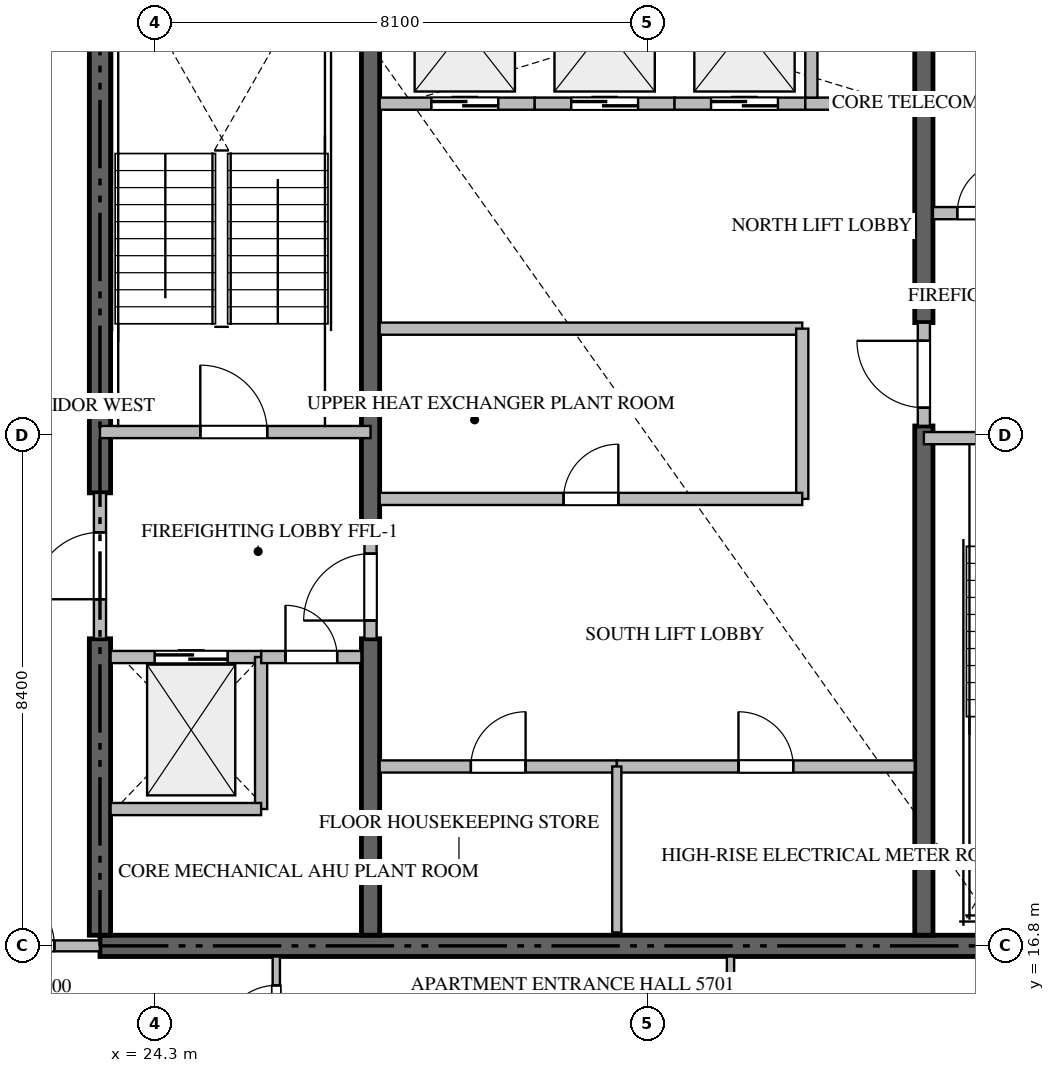
"""IFC4 building model, lengths in metres.
Left out: names, types, materials, properties, quantities, classifications, styles, units other than length and angle.
Written with IfcOpenShell. Run it as: python <this file> out.ifc"""

import sys

from ifc_helpers import new_model, si_unit, direction, frame, frame_2d, origin, place, context, subcontext, project, spatial, rectangle, extrude, source, transform, mapped, element, fill, save


model = new_model("IFC4")
c1 = context("Model", 3, precision=1e-05, world=origin(), true_north=direction((0.0, 1.0)))
c2 = subcontext(c1, "Body", "Model", "MODEL_VIEW")
j1 = project(units=[si_unit("LENGTHUNIT", "METRE"), si_unit("PLANEANGLEUNIT", "RADIAN")], contexts=[c1])
p1 = place(None, origin())
s1 = spatial("IfcSite", under=j1, at=p1, CompositionType="ELEMENT")
p2 = place(p1, origin())
s2 = spatial("IfcBuilding", under=s1, at=p2, CompositionType="ELEMENT")
p3 = place(p2, frame((0.0, 0.0, 229.7)))
s3 = spatial("IfcBuildingStorey", under=s2, at=p3, CompositionType="ELEMENT", Elevation=229.7)
p4 = place(p3, frame((23.4, 16.8, -0.26), z_axis=(0.0, 0.0, 1.0), x_axis=(1.0, 0.0, 0.0)))
e1 = element("IfcWall", 1, at=p4, inside=s3, PredefinedType="SHEAR", context=c2, shape_type="SweptSolid", body=[
    extrude(rectangle(XDim=18.0, YDim=0.35, at=frame_2d((9.0, 0.0))), origin(), (0.0, 0.0, 1.0), 3.848),
])
p5 = place(p3, frame((23.4, 16.975, -0.26), z_axis=(0.0, 0.0, 1.0), x_axis=(0.0, 1.0, 0.0)))
e2 = element("IfcWall", 2, at=p5, inside=s3, PredefinedType="SHEAR", context=c2, shape_type="SweptSolid", body=[
    extrude(rectangle(XDim=4.875, YDim=0.35, at=frame_2d((2.438, 0.0))), origin(), (0.0, 0.0, 1.0), 3.848),
])
p6 = place(p3, frame((23.4, 24.25, -0.26), z_axis=(0.0, 0.0, 1.0), x_axis=(0.0, 1.0, 0.0)))
e3 = element("IfcWall", 3, at=p6, inside=s3, PredefinedType="SHEAR", context=c2, shape_type="SweptSolid", body=[
    extrude(rectangle(XDim=9.175, YDim=0.35, at=frame_2d((4.587, 0.0))), origin(), (0.0, 0.0, 1.0), 3.848),
])
p7 = place(p3, frame((27.85, 16.975, -0.26), z_axis=(0.0, 0.0, 1.0), x_axis=(0.0, 1.0, 0.0)))
e4 = element("IfcWall", 4, at=p7, inside=s3, PredefinedType="SHEAR", context=c2, shape_type="SweptSolid", body=[
    extrude(rectangle(XDim=4.875, YDim=0.3, at=frame_2d((2.438, 0.0))), origin(), (0.0, 0.0, 1.0), 3.848),
])
p8 = place(p3, frame((27.85, 23.55, -0.26), z_axis=(0.0, 0.0, 1.0), x_axis=(0.0, 1.0, 0.0)))
e5 = element("IfcWall", 5, at=p8, inside=s3, PredefinedType="SHEAR", context=c2, shape_type="SweptSolid", body=[
    extrude(rectangle(XDim=9.875, YDim=0.3, at=frame_2d((4.938, 0.0))), origin(), (0.0, 0.0, 1.0), 3.848),
])
p9 = place(p3, frame((36.95, 16.975, -0.26), z_axis=(0.0, 0.0, 1.0), x_axis=(0.0, 1.0, 0.0)))
e6 = element("IfcWall", 6, at=p9, inside=s3, PredefinedType="SHEAR", context=c2, shape_type="SweptSolid", body=[
    extrude(rectangle(XDim=8.375, YDim=0.3, at=frame_2d((4.188, 0.0))), origin(), (0.0, 0.0, 1.0), 3.848),
])
p10 = place(p3, frame((36.95, 27.05, -0.26), z_axis=(0.0, 0.0, 1.0), x_axis=(0.0, 1.0, 0.0)))
e7 = element("IfcWall", 7, at=p10, inside=s3, PredefinedType="SHEAR", context=c2, shape_type="SweptSolid", body=[
    extrude(rectangle(XDim=6.375, YDim=0.3, at=frame_2d((3.188, 0.0))), origin(), (0.0, 0.0, 1.0), 3.848),
])
p11 = place(p3, frame((23.4, 25.25, 0.0), z_axis=(0.0, 0.0, 1.0), x_axis=(1.0, 0.0, 0.0)))
e8 = element("IfcWall", 8, at=p11, inside=s3, PredefinedType="STANDARD", context=c2, shape_type="SweptSolid", body=[
    extrude(rectangle(XDim=4.45, YDim=0.2, at=frame_2d((2.225, 0.0))), origin(), (0.0, 0.0, 1.0), 3.59),
])
p12 = place(p11, frame((1.65, 0.0, 0.0)))
e9 = element("IfcOpeningElement", 9, at=p12, cuts=e8, PredefinedType="OPENING", context=c2, shape_type="SweptSolid", body=[
    extrude(rectangle(XDim=1.1, YDim=2.15, at=frame_2d((0.55, 1.075))), frame((0.0, 0.11, 0.0), z_axis=(0.0, -1.0, 0.0), x_axis=(1.0, 0.0, 0.0)), (0.0, 0.0, 1.0), 0.22),
])
p13 = place(p3, frame((36.95, 25.15, 0.0), z_axis=(0.0, 0.0, 1.0), x_axis=(1.0, 0.0, 0.0)))
e10 = element("IfcWall", 10, at=p13, inside=s3, PredefinedType="STANDARD", context=c2, shape_type="SweptSolid", body=[
    extrude(rectangle(XDim=4.45, YDim=0.2, at=frame_2d((2.225, 0.0))), origin(), (0.0, 0.0, 1.0), 3.59),
])
p14 = place(p13, frame((1.65, 0.0, 0.0)))
e11 = element("IfcOpeningElement", 11, at=p14, cuts=e10, PredefinedType="OPENING", context=c2, shape_type="SweptSolid", body=[
    extrude(rectangle(XDim=1.1, YDim=2.15, at=frame_2d((0.55, 1.075))), frame((0.0, 0.11, 0.0), z_axis=(0.0, -1.0, 0.0), x_axis=(1.0, 0.0, 0.0)), (0.0, 0.0, 1.0), 0.22),
])
p15 = place(p3, frame((23.575, 21.55, 0.0), z_axis=(0.0, 0.0, 1.0), x_axis=(1.0, 0.0, 0.0)))
e12 = element("IfcWall", 12, at=p15, inside=s3, PredefinedType="STANDARD", context=c2, shape_type="SweptSolid", body=[
    extrude(rectangle(XDim=2.475, YDim=0.2, at=frame_2d((1.238, 0.0))), origin(), (0.0, 0.0, 1.0), 3.59),
])
p16 = place(p15, frame((0.725, 0.0, 0.0)))
e13 = element("IfcOpeningElement", 13, at=p16, cuts=e12, PredefinedType="OPENING", context=c2, shape_type="SweptSolid", body=[
    extrude(rectangle(XDim=1.2, YDim=2.2, at=frame_2d((0.6, 1.1))), frame((0.0, 0.11, 0.0), z_axis=(0.0, -1.0, 0.0), x_axis=(1.0, 0.0, 0.0)), (0.0, 0.0, 1.0), 0.22),
])
p17 = place(p3, frame((28.0, 30.65, 0.0), z_axis=(0.0, 0.0, 1.0), x_axis=(1.0, 0.0, 0.0)))
e14 = element("IfcWall", 14, at=p17, inside=s3, PredefinedType="STANDARD", context=c2, shape_type="SweptSolid", body=[
    extrude(rectangle(XDim=2.55, YDim=0.2, at=frame_2d((1.275, 0.0))), origin(), (0.0, 0.0, 1.0), 3.59),
])
p18 = place(p17, frame((0.85, 0.0, 0.0)))
e15 = element("IfcOpeningElement", 15, at=p18, cuts=e14, PredefinedType="OPENING", context=c2, shape_type="SweptSolid", body=[
    extrude(rectangle(XDim=1.1, YDim=2.2, at=frame_2d((0.55, 1.1))), frame((0.0, 0.11, 0.0), z_axis=(0.0, -1.0, 0.0), x_axis=(1.0, 0.0, 0.0)), (0.0, 0.0, 1.0), 0.22),
])
p19 = place(p3, frame((30.55, 30.65, 0.0), z_axis=(0.0, 0.0, 1.0), x_axis=(1.0, 0.0, 0.0)))
e16 = element("IfcWall", 16, at=p19, inside=s3, PredefinedType="STANDARD", context=c2, shape_type="SweptSolid", body=[
    extrude(rectangle(XDim=2.3, YDim=0.2, at=frame_2d((1.15, 0.0))), origin(), (0.0, 0.0, 1.0), 3.59),
])
p20 = place(p19, frame((0.6, 0.0, 0.0)))
e17 = element("IfcOpeningElement", 17, at=p20, cuts=e16, PredefinedType="OPENING", context=c2, shape_type="SweptSolid", body=[
    extrude(rectangle(XDim=1.1, YDim=2.2, at=frame_2d((0.55, 1.1))), frame((0.0, 0.11, 0.0), z_axis=(0.0, -1.0, 0.0), x_axis=(1.0, 0.0, 0.0)), (0.0, 0.0, 1.0), 0.22),
])
p21 = place(p3, frame((32.85, 30.65, 0.0), z_axis=(0.0, 0.0, 1.0), x_axis=(1.0, 0.0, 0.0)))
e18 = element("IfcWall", 18, at=p21, inside=s3, PredefinedType="STANDARD", context=c2, shape_type="SweptSolid", body=[
    extrude(rectangle(XDim=2.15, YDim=0.2, at=frame_2d((1.075, 0.0))), origin(), (0.0, 0.0, 1.0), 3.59),
])
p22 = place(p21, frame((0.6, 0.0, 0.0)))
e19 = element("IfcOpeningElement", 19, at=p22, cuts=e18, PredefinedType="OPENING", context=c2, shape_type="SweptSolid", body=[
    extrude(rectangle(XDim=1.1, YDim=2.2, at=frame_2d((0.55, 1.1))), frame((0.0, 0.11, 0.0), z_axis=(0.0, -1.0, 0.0), x_axis=(1.0, 0.0, 0.0)), (0.0, 0.0, 1.0), 0.22),
])
p23 = place(p3, frame((35.0, 30.65, 0.0), z_axis=(0.0, 0.0, 1.0), x_axis=(1.0, 0.0, 0.0)))
e20 = element("IfcWall", 20, at=p23, inside=s3, PredefinedType="STANDARD", context=c2, shape_type="SweptSolid", body=[
    extrude(rectangle(XDim=1.8, YDim=0.2, at=frame_2d((0.9, 0.0))), origin(), (0.0, 0.0, 1.0), 3.59),
])
p24 = place(p3, frame((35.1, 30.75, 0.0), z_axis=(0.0, 0.0, 1.0), x_axis=(0.0, 1.0, 0.0)))
e21 = element("IfcWall", 21, at=p24, inside=s3, PredefinedType="STANDARD", context=c2, shape_type="SweptSolid", body=[
    extrude(rectangle(XDim=2.675, YDim=0.2, at=frame_2d((1.337, 0.0))), origin(), (0.0, 0.0, 1.0), 3.59),
])
p25 = place(p3, frame((26.05, 19.05, 0.0), z_axis=(0.0, 0.0, 1.0), x_axis=(0.0, 1.0, 0.0)))
e22 = element("IfcWall", 22, at=p25, inside=s3, PredefinedType="STANDARD", context=c2, shape_type="SweptSolid", body=[
    extrude(rectangle(XDim=2.5, YDim=0.2, at=frame_2d((1.25, 0.0))), origin(), (0.0, 0.0, 1.0), 3.59),
])
p26 = place(p3, frame((23.575, 19.05, 0.0), z_axis=(0.0, 0.0, 1.0), x_axis=(1.0, 0.0, 0.0)))
e23 = element("IfcWall", 23, at=p26, inside=s3, PredefinedType="STANDARD", context=c2, shape_type="SweptSolid", body=[
    extrude(rectangle(XDim=2.475, YDim=0.2, at=frame_2d((1.238, 0.0))), origin(), (0.0, 0.0, 1.0), 3.59),
])
p27 = place(p3, frame((26.052, 21.55, 0.0), z_axis=(0.0, 0.0, 1.0), x_axis=(1.0, 0.0, 0.0)))
e24 = element("IfcWall", 24, at=p27, inside=s3, PredefinedType="STANDARD", context=c2, shape_type="SweptSolid", body=[
    extrude(rectangle(XDim=1.648, YDim=0.2, at=frame_2d((0.824, 0.0))), origin(), (0.0, 0.0, 1.0), 3.59),
])
p28 = place(p27, frame((0.399, 0.0, 0.0)))
e25 = element("IfcOpeningElement", 25, at=p28, cuts=e24, PredefinedType="OPENING", context=c2, shape_type="SweptSolid", body=[
    extrude(rectangle(XDim=0.85, YDim=2.1, at=frame_2d((0.425, 1.05))), frame((0.0, 0.11, 0.0), z_axis=(0.0, -1.0, 0.0), x_axis=(1.0, 0.0, 0.0)), (0.0, 0.0, 1.0), 0.22),
])
p29 = place(p3, frame((37.1, 28.85, 0.0), z_axis=(0.0, 0.0, 1.0), x_axis=(1.0, 0.0, 0.0)))
e26 = element("IfcWall", 26, at=p29, inside=s3, PredefinedType="STANDARD", context=c2, shape_type="SweptSolid", body=[
    extrude(rectangle(XDim=1.648, YDim=0.2, at=frame_2d((0.824, 0.0))), origin(), (0.0, 0.0, 1.0), 3.59),
])
p30 = place(p29, frame((0.399, 0.0, 0.0)))
e27 = element("IfcOpeningElement", 27, at=p30, cuts=e26, PredefinedType="OPENING", context=c2, shape_type="SweptSolid", body=[
    extrude(rectangle(XDim=0.85, YDim=2.1, at=frame_2d((0.425, 1.05))), frame((0.0, 0.11, 0.0), z_axis=(0.0, -1.0, 0.0), x_axis=(1.0, 0.0, 0.0)), (0.0, 0.0, 1.0), 0.22),
])
p31 = place(p3, frame((23.4, 21.852, 0.0), z_axis=(0.0, 0.0, 1.0), x_axis=(0.0, 1.0, 0.0)))
e28 = element("IfcWall", 28, at=p31, inside=s3, PredefinedType="STANDARD", context=c2, shape_type="SweptSolid", body=[
    extrude(rectangle(XDim=2.396, YDim=0.2, at=frame_2d((1.198, 0.0))), origin(), (0.0, 0.0, 1.0), 3.59),
])
p32 = place(p31, frame((0.648, 0.0, 0.0)))
e29 = element("IfcOpeningElement", 29, at=p32, cuts=e28, PredefinedType="OPENING", context=c2, shape_type="SweptSolid", body=[
    extrude(rectangle(XDim=1.1, YDim=2.15, at=frame_2d((0.55, 1.075))), frame((0.0, 0.11, 0.0), z_axis=(0.0, -1.0, 0.0), x_axis=(1.0, 0.0, 0.0)), (0.0, 0.0, 1.0), 0.22),
])
p33 = place(p3, frame((27.85, 21.852, 0.0), z_axis=(0.0, 0.0, 1.0), x_axis=(0.0, 1.0, 0.0)))
e30 = element("IfcWall", 30, at=p33, inside=s3, PredefinedType="STANDARD", context=c2, shape_type="SweptSolid", body=[
    extrude(rectangle(XDim=1.696, YDim=0.2, at=frame_2d((0.848, 0.0))), origin(), (0.0, 0.0, 1.0), 3.59),
])
p34 = place(p33, frame((0.298, 0.0, 0.0)))
e31 = element("IfcOpeningElement", 31, at=p34, cuts=e30, PredefinedType="OPENING", context=c2, shape_type="SweptSolid", body=[
    extrude(rectangle(XDim=1.1, YDim=2.15, at=frame_2d((0.55, 1.075))), frame((0.0, 0.11, 0.0), z_axis=(0.0, -1.0, 0.0), x_axis=(1.0, 0.0, 0.0)), (0.0, 0.0, 1.0), 0.22),
])
p35 = place(p3, frame((36.95, 25.352, 0.0), z_axis=(0.0, 0.0, 1.0), x_axis=(0.0, 1.0, 0.0)))
e32 = element("IfcWall", 32, at=p35, inside=s3, PredefinedType="STANDARD", context=c2, shape_type="SweptSolid", body=[
    extrude(rectangle(XDim=1.696, YDim=0.2, at=frame_2d((0.848, 0.0))), origin(), (0.0, 0.0, 1.0), 3.59),
])
p36 = place(p35, frame((0.298, 0.0, 0.0)))
e33 = element("IfcOpeningElement", 33, at=p36, cuts=e32, PredefinedType="OPENING", context=c2, shape_type="SweptSolid", body=[
    extrude(rectangle(XDim=1.1, YDim=2.15, at=frame_2d((0.55, 1.075))), frame((0.0, 0.11, 0.0), z_axis=(0.0, -1.0, 0.0), x_axis=(1.0, 0.0, 0.0)), (0.0, 0.0, 1.0), 0.22),
])
p37 = place(p3, frame((28.0, 19.75, 0.0), z_axis=(0.0, 0.0, 1.0), x_axis=(1.0, 0.0, 0.0)))
e34 = element("IfcWall", 34, at=p37, inside=s3, PredefinedType="STANDARD", context=c2, shape_type="SweptSolid", body=[
    extrude(rectangle(XDim=3.9, YDim=0.2, at=frame_2d((1.95, 0.0))), origin(), (0.0, 0.0, 1.0), 3.59),
])
p38 = place(p37, frame((1.5, 0.0, 0.0)))
e35 = element("IfcOpeningElement", 35, at=p38, cuts=e34, PredefinedType="OPENING", context=c2, shape_type="SweptSolid", body=[
    extrude(rectangle(XDim=0.9, YDim=2.1, at=frame_2d((0.45, 1.05))), frame((0.0, 0.11, 0.0), z_axis=(0.0, -1.0, 0.0), x_axis=(1.0, 0.0, 0.0)), (0.0, 0.0, 1.0), 0.22),
])
p39 = place(p3, frame((31.902, 19.75, 0.0), z_axis=(0.0, 0.0, 1.0), x_axis=(1.0, 0.0, 0.0)))
e36 = element("IfcWall", 36, at=p39, inside=s3, PredefinedType="STANDARD", context=c2, shape_type="SweptSolid", body=[
    extrude(rectangle(XDim=4.898, YDim=0.2, at=frame_2d((2.449, 0.0))), origin(), (0.0, 0.0, 1.0), 3.59),
])
p40 = place(p39, frame((1.999, 0.0, 0.0)))
e37 = element("IfcOpeningElement", 37, at=p40, cuts=e36, PredefinedType="OPENING", context=c2, shape_type="SweptSolid", body=[
    extrude(rectangle(XDim=0.9, YDim=2.1, at=frame_2d((0.45, 1.05))), frame((0.0, 0.11, 0.0), z_axis=(0.0, -1.0, 0.0), x_axis=(1.0, 0.0, 0.0)), (0.0, 0.0, 1.0), 0.22),
])
p41 = place(p3, frame((31.9, 17.02, 0.0), z_axis=(0.0, 0.0, 1.0), x_axis=(0.0, 1.0, 0.0)))
e38 = element("IfcWall", 38, at=p41, inside=s3, PredefinedType="PARTITIONING", context=c2, shape_type="SweptSolid", body=[
    extrude(rectangle(XDim=2.73, YDim=0.15, at=frame_2d((1.365, 0.0))), origin(), (0.0, 0.0, 1.0), 3.59),
])
p42 = place(p3, frame((28.0, 26.95, 0.0), z_axis=(0.0, 0.0, 1.0), x_axis=(1.0, 0.0, 0.0)))
e39 = element("IfcWall", 39, at=p42, inside=s3, PredefinedType="STANDARD", context=c2, shape_type="SweptSolid", body=[
    extrude(rectangle(XDim=6.95, YDim=0.2, at=frame_2d((3.475, 0.0))), origin(), (0.0, 0.0, 1.0), 3.59),
])
p43 = place(p3, frame((34.95, 24.15, 0.0), z_axis=(0.0, 0.0, 1.0), x_axis=(0.0, 1.0, 0.0)))
e40 = element("IfcWall", 40, at=p43, inside=s3, PredefinedType="STANDARD", context=c2, shape_type="SweptSolid", body=[
    extrude(rectangle(XDim=2.8, YDim=0.2, at=frame_2d((1.4, 0.0))), origin(), (0.0, 0.0, 1.0), 3.59),
])
p44 = place(p3, frame((28.0, 24.15, 0.0), z_axis=(0.0, 0.0, 1.0), x_axis=(1.0, 0.0, 0.0)))
e41 = element("IfcWall", 41, at=p44, inside=s3, PredefinedType="STANDARD", context=c2, shape_type="SweptSolid", body=[
    extrude(rectangle(XDim=6.95, YDim=0.2, at=frame_2d((3.475, 0.0))), origin(), (0.0, 0.0, 1.0), 3.59),
])
p45 = place(p44, frame((3.025, 0.0, 0.0)))
e42 = element("IfcOpeningElement", 42, at=p45, cuts=e41, PredefinedType="OPENING", context=c2, shape_type="SweptSolid", body=[
    extrude(rectangle(XDim=0.9, YDim=2.1, at=frame_2d((0.45, 1.05))), frame((0.0, 0.11, 0.0), z_axis=(0.0, -1.0, 0.0), x_axis=(1.0, 0.0, 0.0)), (0.0, 0.0, 1.0), 0.22),
])
p46 = place(p3, frame((20.902, 16.8, 0.0), z_axis=(0.0, 0.0, 1.0), x_axis=(1.0, 0.0, 0.0)))
e43 = element("IfcWall", 43, at=p46, inside=s3, PredefinedType="PARTITIONING", context=c2, shape_type="SweptSolid", body=[
    extrude(rectangle(XDim=2.496, YDim=0.18, at=frame_2d((1.248, 0.0))), origin(), (0.0, 0.0, 1.0), 3.59),
])
p47 = place(p46, frame((0.748, 0.0, 0.0)))
e44 = element("IfcOpeningElement", 44, at=p47, cuts=e43, PredefinedType="OPENING", context=c2, shape_type="SweptSolid", body=[
    extrude(rectangle(XDim=1.0, YDim=2.15, at=frame_2d((0.5, 1.075))), frame((0.0, 0.1, 0.0), z_axis=(0.0, -1.0, 0.0), x_axis=(1.0, 0.0, 0.0)), (0.0, 0.0, 1.0), 0.2),
])
p48 = place(p3, frame((26.3, 14.65, 0.0), z_axis=(0.0, 0.0, 1.0), x_axis=(0.0, 1.0, 0.0)))
e45 = element("IfcWall", 45, at=p48, inside=s3, PredefinedType="PARTITIONING", context=c2, shape_type="SweptSolid", body=[
    extrude(rectangle(XDim=1.975, YDim=0.12, at=frame_2d((0.988, 0.0))), origin(), (0.0, 0.0, 1.0), 3.59),
])
p49 = place(p48, frame((0.601, 0.0, 0.0)))
e46 = element("IfcOpeningElement", 46, at=p49, cuts=e45, PredefinedType="OPENING", context=c2, shape_type="SweptSolid", body=[
    extrude(rectangle(XDim=0.9, YDim=2.1, at=frame_2d((0.45, 1.05))), frame((0.0, 0.07, 0.0), z_axis=(0.0, -1.0, 0.0), x_axis=(1.0, 0.0, 0.0)), (0.0, 0.0, 1.0), 0.14),
])
p50 = place(p3, frame((33.77, 14.652, 0.0), z_axis=(0.0, 0.0, 1.0), x_axis=(0.0, 1.0, 0.0)))
e47 = element("IfcWall", 47, at=p50, inside=s3, PredefinedType="PARTITIONING", context=c2, shape_type="SweptSolid", body=[
    extrude(rectangle(XDim=1.973, YDim=0.12, at=frame_2d((0.986, 0.0))), origin(), (0.0, 0.0, 1.0), 3.59),
])
m1 = source(origin(), c2, "Body", "SweptSolid", [
    extrude(rectangle(XDim=1.1, YDim=2.15, at=frame_2d((0.55, 1.075))), frame((0.0, 0.025, 0.0), z_axis=(0.0, -1.0, 0.0), x_axis=(1.0, 0.0, 0.0)), (0.0, 0.0, 1.0), 0.05),
])
p51 = place(p12, origin())
e48 = element("IfcDoor", 48, at=p51, inside=s3, OperationType="SINGLE_SWING_LEFT", PredefinedType="DOOR", context=c2, shape_type="MappedRepresentation", body=[
    mapped(m1, transform((0.0, 0.0, 0.0), scale=1.0)),
])
fill(e9, e48)
m2 = source(origin(), c2, "Body", "SweptSolid", [
    extrude(rectangle(XDim=1.2, YDim=2.2, at=frame_2d((0.6, 1.1))), frame((0.0, 0.025, 0.0), z_axis=(0.0, -1.0, 0.0), x_axis=(1.0, 0.0, 0.0)), (0.0, 0.0, 1.0), 0.05),
])
p52 = place(p16, origin())
e49 = element("IfcDoor", 49, at=p52, inside=s3, OperationType="DOUBLE_DOOR_SLIDING", PredefinedType="DOOR", context=c2, shape_type="MappedRepresentation", body=[
    mapped(m2, transform((0.0, 0.0, 0.0), scale=1.0)),
])
fill(e13, e49)
m3 = source(origin(), c2, "Body", "SweptSolid", [
    extrude(rectangle(XDim=1.1, YDim=2.2, at=frame_2d((0.55, 1.1))), frame((0.0, 0.025, 0.0), z_axis=(0.0, -1.0, 0.0), x_axis=(1.0, 0.0, 0.0)), (0.0, 0.0, 1.0), 0.05),
])
p53 = place(p18, origin())
e50 = element("IfcDoor", 50, at=p53, inside=s3, OperationType="DOUBLE_DOOR_SLIDING", PredefinedType="DOOR", context=c2, shape_type="MappedRepresentation", body=[
    mapped(m3, transform((0.0, 0.0, 0.0), scale=1.0)),
])
fill(e15, e50)
p54 = place(p20, origin())
e51 = element("IfcDoor", 51, at=p54, inside=s3, OperationType="DOUBLE_DOOR_SLIDING", PredefinedType="DOOR", context=c2, shape_type="MappedRepresentation", body=[
    mapped(m3, transform((0.0, 0.0, 0.0), scale=1.0)),
])
fill(e17, e51)
p55 = place(p22, origin())
e52 = element("IfcDoor", 52, at=p55, inside=s3, OperationType="DOUBLE_DOOR_SLIDING", PredefinedType="DOOR", context=c2, shape_type="MappedRepresentation", body=[
    mapped(m3, transform((0.0, 0.0, 0.0), scale=1.0)),
])
fill(e19, e52)
m4 = source(origin(), c2, "Body", "SweptSolid", [
    extrude(rectangle(XDim=0.85, YDim=2.1, at=frame_2d((0.425, 1.05))), frame((0.0, 0.025, 0.0), z_axis=(0.0, -1.0, 0.0), x_axis=(1.0, 0.0, 0.0)), (0.0, 0.0, 1.0), 0.05),
])
p56 = place(p28, origin())
e53 = element("IfcDoor", 53, at=p56, inside=s3, OperationType="SINGLE_SWING_LEFT", PredefinedType="DOOR", context=c2, shape_type="MappedRepresentation", body=[
    mapped(m4, transform((0.0, 0.0, 0.0), scale=1.0)),
])
fill(e25, e53)
p57 = place(p30, origin())
e54 = element("IfcDoor", 54, at=p57, inside=s3, OperationType="SINGLE_SWING_RIGHT", PredefinedType="DOOR", context=c2, shape_type="MappedRepresentation", body=[
    mapped(m4, transform((0.0, 0.0, 0.0), scale=1.0)),
])
fill(e27, e54)
p58 = place(p32, origin())
e55 = element("IfcDoor", 55, at=p58, inside=s3, OperationType="SINGLE_SWING_LEFT", PredefinedType="DOOR", context=c2, shape_type="MappedRepresentation", body=[
    mapped(m1, transform((0.0, 0.0, 0.0), scale=1.0)),
])
fill(e29, e55)
p59 = place(p34, origin())
e56 = element("IfcDoor", 56, at=p59, inside=s3, OperationType="SINGLE_SWING_LEFT", PredefinedType="DOOR", context=c2, shape_type="MappedRepresentation", body=[
    mapped(m1, transform((0.0, 0.0, 0.0), scale=1.0)),
])
fill(e31, e56)
p60 = place(p36, origin())
e57 = element("IfcDoor", 57, at=p60, inside=s3, OperationType="SINGLE_SWING_RIGHT", PredefinedType="DOOR", context=c2, shape_type="MappedRepresentation", body=[
    mapped(m1, transform((0.0, 0.0, 0.0), scale=1.0)),
])
fill(e33, e57)
m5 = source(origin(), c2, "Body", "SweptSolid", [
    extrude(rectangle(XDim=0.9, YDim=2.1, at=frame_2d((0.45, 1.05))), frame((0.0, 0.025, 0.0), z_axis=(0.0, -1.0, 0.0), x_axis=(1.0, 0.0, 0.0)), (0.0, 0.0, 1.0), 0.05),
])
p61 = place(p38, origin())
e58 = element("IfcDoor", 58, at=p61, inside=s3, OperationType="SINGLE_SWING_RIGHT", PredefinedType="DOOR", context=c2, shape_type="MappedRepresentation", body=[
    mapped(m5, transform((0.0, 0.0, 0.0), scale=1.0)),
])
fill(e35, e58)
p62 = place(p40, origin())
e59 = element("IfcDoor", 59, at=p62, inside=s3, OperationType="SINGLE_SWING_LEFT", PredefinedType="DOOR", context=c2, shape_type="MappedRepresentation", body=[
    mapped(m5, transform((0.0, 0.0, 0.0), scale=1.0)),
])
fill(e37, e59)
p63 = place(p45, origin())
e60 = element("IfcDoor", 60, at=p63, inside=s3, OperationType="SINGLE_SWING_RIGHT", PredefinedType="DOOR", context=c2, shape_type="MappedRepresentation", body=[
    mapped(m5, transform((0.0, 0.0, 0.0), scale=1.0)),
])
fill(e42, e60)
m6 = source(origin(), c2, "Body", "SweptSolid", [
    extrude(rectangle(XDim=1.0, YDim=2.15, at=frame_2d((0.5, 1.075))), frame((0.0, 0.025, 0.0), z_axis=(0.0, -1.0, 0.0), x_axis=(1.0, 0.0, 0.0)), (0.0, 0.0, 1.0), 0.05),
])
p64 = place(p47, origin())
e61 = element("IfcDoor", 61, at=p64, inside=s3, OperationType="SINGLE_SWING_LEFT", PredefinedType="DOOR", context=c2, shape_type="MappedRepresentation", body=[
    mapped(m6, transform((0.0, 0.0, 0.0), scale=1.0)),
])
fill(e44, e61)
p65 = place(p49, origin())
e62 = element("IfcDoor", 62, at=p65, inside=s3, OperationType="SINGLE_SWING_LEFT", PredefinedType="DOOR", context=c2, shape_type="MappedRepresentation", body=[
    mapped(m5, transform((0.0, 0.0, 0.0), scale=1.0)),
])
fill(e46, e62)
save(model, sys.argv[1])
